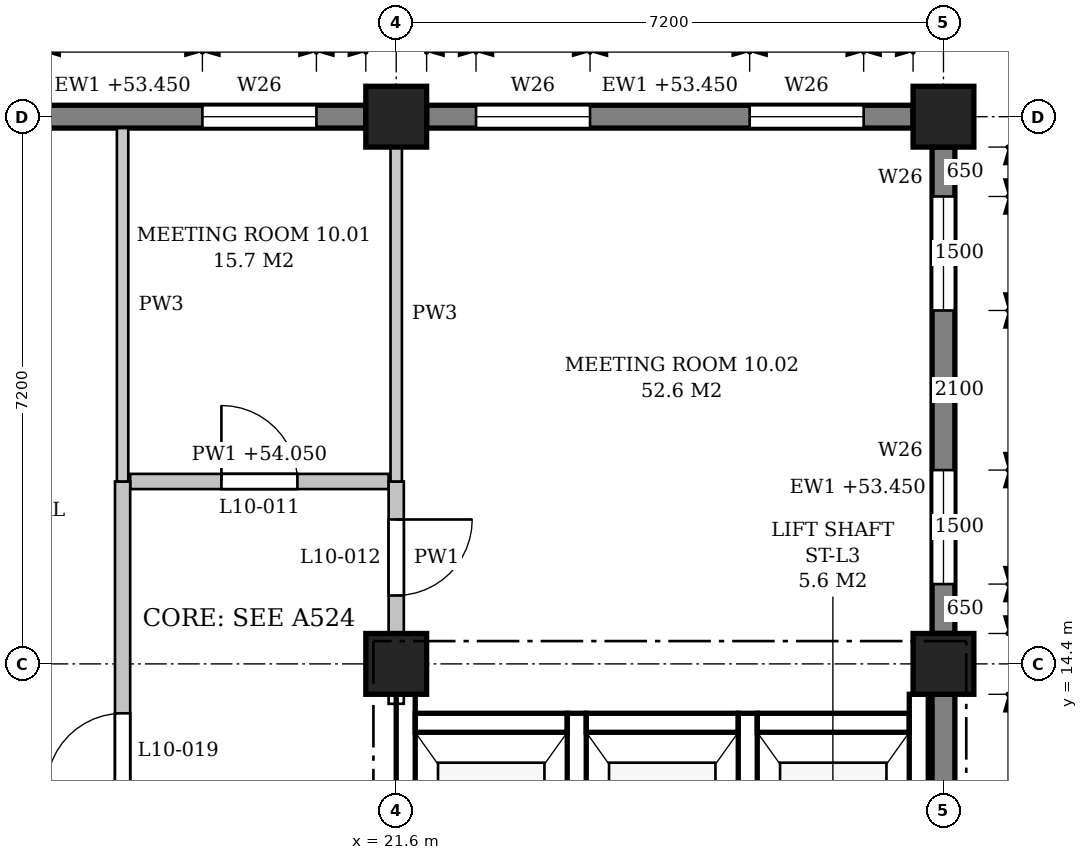
"""IFC4 building model, lengths in metres.
Left out: names, types, materials, properties, quantities, classifications, styles, units other than length and angle.
Written with IfcOpenShell. Run it as: python <this file> out.ifc"""

import sys

from ifc_helpers import new_model, si_unit, direction, frame, frame_2d, origin, origin_2d, place, context, subcontext, project, spatial, polyline, rectangle, outline, extrude, element, fill, save


model = new_model("IFC4")
c1 = context("Model", 3, precision=1e-05, world=origin(), true_north=direction((0.0, 1.0)))
c2 = subcontext(c1, "Body", "Model", "MODEL_VIEW")
j1 = project(units=[si_unit("LENGTHUNIT", "METRE"), si_unit("PLANEANGLEUNIT", "RADIAN")], contexts=[c1])
p1 = place(None, origin())
s1 = spatial("IfcSite", under=j1, at=p1, CompositionType="ELEMENT")
p2 = place(p1, origin())
s2 = spatial("IfcBuilding", under=s1, at=p2, CompositionType="ELEMENT")
p3 = place(p2, frame((0.0, 0.0, 49.8)))
s3 = spatial("IfcBuildingStorey", under=s2, at=p3, CompositionType="ELEMENT", Elevation=49.8)
for number, where, z_axis, x_axis in (
    (1, (21.6, 14.4, 0.0), (0.0, 0.0, 1.0), (1.0, 0.0, 0.0)),
    (2, (21.6, 21.6, 0.0), (0.0, 0.0, 1.0), (1.0, 0.0, 0.0)),
    (3, (28.8, 14.4, 0.0), (0.0, 0.0, 1.0), (1.0, 0.0, 0.0)),
    (4, (28.8, 21.6, 0.0), (0.0, 0.0, 1.0), (1.0, 0.0, 0.0)),
):
    element("IfcColumn", number, at=place(p3, frame(where, z_axis=z_axis, x_axis=x_axis)), inside=s3, PredefinedType="COLUMN", context=c2, shape_type="SweptSolid", body=[
        extrude(rectangle(XDim=0.8, YDim=0.8, at=origin_2d()), origin(), (0.0, 0.0, 1.0), 4.5),
    ])
p4 = place(p3, frame((28.8, 7.6, 0.0), z_axis=(0.0, 0.0, 1.0), x_axis=(0.0, 1.0, 0.0)))
e5 = element("IfcWall", 5, at=p4, inside=s3, PredefinedType="STANDARD", context=c2, shape_type="SweptSolid", body=[
    extrude(rectangle(XDim=6.4, YDim=0.3, at=frame_2d((3.2, 0.0))), origin(), (0.0, 0.0, 1.0), 3.65),
])
p5 = place(p4, frame((0.65, 0.0, 0.9)))
e6 = element("IfcOpeningElement", 6, at=p5, cuts=e5, PredefinedType="OPENING", context=c2, shape_type="SweptSolid", body=[
    extrude(outline(polyline([(0.0, 0.0), (1.5, 0.0), (1.5, 1.85), (0.75, 2.6), (0.0, 1.85), (0.0, 0.0)])), frame((0.0, 0.16, 0.0), z_axis=(0.0, -1.0, 0.0), x_axis=(1.0, 0.0, 0.0)), (0.0, 0.0, 1.0), 0.32),
])
p6 = place(p3, frame((28.8, 14.8, 0.0), z_axis=(0.0, 0.0, 1.0), x_axis=(0.0, 1.0, 0.0)))
e7 = element("IfcWall", 7, at=p6, inside=s3, PredefinedType="STANDARD", context=c2, shape_type="SweptSolid", body=[
    extrude(rectangle(XDim=6.4, YDim=0.3, at=frame_2d((3.2, 0.0))), origin(), (0.0, 0.0, 1.0), 3.65),
])
p7 = place(p6, frame((0.65, 0.0, 0.9)))
e8 = element("IfcOpeningElement", 8, at=p7, cuts=e7, PredefinedType="OPENING", context=c2, shape_type="SweptSolid", body=[
    extrude(outline(polyline([(0.0, 0.0), (1.5, 0.0), (1.5, 1.85), (0.75, 2.6), (0.0, 1.85), (0.0, 0.0)])), frame((0.0, 0.16, 0.0), z_axis=(0.0, -1.0, 0.0), x_axis=(1.0, 0.0, 0.0)), (0.0, 0.0, 1.0), 0.32),
])
p8 = place(p6, frame((4.25, 0.0, 0.9)))
e9 = element("IfcOpeningElement", 9, at=p8, cuts=e7, PredefinedType="OPENING", context=c2, shape_type="SweptSolid", body=[
    extrude(outline(polyline([(0.0, 0.0), (1.5, 0.0), (1.5, 1.85), (0.75, 2.6), (0.0, 1.85), (0.0, 0.0)])), frame((0.0, 0.16, 0.0), z_axis=(0.0, -1.0, 0.0), x_axis=(1.0, 0.0, 0.0)), (0.0, 0.0, 1.0), 0.32),
])
p9 = place(p3, frame((28.4, 21.6, 0.0), z_axis=(0.0, 0.0, 1.0), x_axis=(-1.0, 0.0, 0.0)))
e10 = element("IfcWall", 10, at=p9, inside=s3, PredefinedType="STANDARD", context=c2, shape_type="SweptSolid", body=[
    extrude(rectangle(XDim=6.4, YDim=0.3, at=frame_2d((3.2, 0.0))), origin(), (0.0, 0.0, 1.0), 3.65),
])
p10 = place(p9, frame((0.65, 0.0, 0.9)))
e11 = element("IfcOpeningElement", 11, at=p10, cuts=e10, PredefinedType="OPENING", context=c2, shape_type="SweptSolid", body=[
    extrude(outline(polyline([(0.0, 0.0), (1.5, 0.0), (1.5, 1.85), (0.75, 2.6), (0.0, 1.85), (0.0, 0.0)])), frame((0.0, 0.16, 0.0), z_axis=(0.0, -1.0, 0.0), x_axis=(1.0, 0.0, 0.0)), (0.0, 0.0, 1.0), 0.32),
])
p11 = place(p9, frame((4.25, 0.0, 0.9)))
e12 = element("IfcOpeningElement", 12, at=p11, cuts=e10, PredefinedType="OPENING", context=c2, shape_type="SweptSolid", body=[
    extrude(outline(polyline([(0.0, 0.0), (1.5, 0.0), (1.5, 1.85), (0.75, 2.6), (0.0, 1.85), (0.0, 0.0)])), frame((0.0, 0.16, 0.0), z_axis=(0.0, -1.0, 0.0), x_axis=(1.0, 0.0, 0.0)), (0.0, 0.0, 1.0), 0.32),
])
p12 = place(p3, frame((21.2, 21.6, 0.0), z_axis=(0.0, 0.0, 1.0), x_axis=(-1.0, 0.0, 0.0)))
e13 = element("IfcWall", 13, at=p12, inside=s3, PredefinedType="STANDARD", context=c2, shape_type="SweptSolid", body=[
    extrude(rectangle(XDim=6.4, YDim=0.3, at=frame_2d((3.2, 0.0))), origin(), (0.0, 0.0, 1.0), 3.65),
])
p13 = place(p12, frame((0.65, 0.0, 0.9)))
e14 = element("IfcOpeningElement", 14, at=p13, cuts=e13, PredefinedType="OPENING", context=c2, shape_type="SweptSolid", body=[
    extrude(outline(polyline([(0.0, 0.0), (1.5, 0.0), (1.5, 1.85), (0.75, 2.6), (0.0, 1.85), (0.0, 0.0)])), frame((0.0, 0.16, 0.0), z_axis=(0.0, -1.0, 0.0), x_axis=(1.0, 0.0, 0.0)), (0.0, 0.0, 1.0), 0.32),
])
p14 = place(p12, frame((4.25, 0.0, 0.9)))
e15 = element("IfcOpeningElement", 15, at=p14, cuts=e13, PredefinedType="OPENING", context=c2, shape_type="SweptSolid", body=[
    extrude(outline(polyline([(0.0, 0.0), (1.5, 0.0), (1.5, 1.85), (0.75, 2.6), (0.0, 1.85), (0.0, 0.0)])), frame((0.0, 0.16, 0.0), z_axis=(0.0, -1.0, 0.0), x_axis=(1.0, 0.0, 0.0)), (0.0, 0.0, 1.0), 0.32),
])
p15 = place(p3, frame((21.725, 10.45, -0.25), z_axis=(0.0, 0.0, 1.0), x_axis=(0.0, 1.0, 0.0)))
e16 = element("IfcWall", 16, at=p15, inside=s3, PredefinedType="SHEAR", context=c2, shape_type="SweptSolid", body=[
    extrude(rectangle(XDim=3.55, YDim=0.25, at=frame_2d((1.775, 0.0))), origin(), (0.0, 0.0, 1.0), 3.8),
])
for number, where, z_axis, x_axis in (
    (17, (23.975, 10.45, -0.25), (0.0, 0.0, 1.0), (0.0, 1.0, 0.0)),
    (18, (26.225, 10.45, -0.25), (0.0, 0.0, 1.0), (0.0, 1.0, 0.0)),
):
    element("IfcWall", number, at=place(p3, frame(where, z_axis=z_axis, x_axis=x_axis)), inside=s3, PredefinedType="SHEAR", context=c2, shape_type="SweptSolid", body=[
        extrude(rectangle(XDim=3.3, YDim=0.25, at=frame_2d((1.65, 0.0))), origin(), (0.0, 0.0, 1.0), 4.5),
    ])
p16 = place(p3, frame((28.475, 10.45, -0.25), z_axis=(0.0, 0.0, 1.0), x_axis=(0.0, 1.0, 0.0)))
e19 = element("IfcWall", 19, at=p16, inside=s3, PredefinedType="SHEAR", context=c2, shape_type="SweptSolid", body=[
    extrude(rectangle(XDim=3.55, YDim=0.25, at=frame_2d((1.775, 0.0))), origin(), (0.0, 0.0, 1.0), 4.5),
])
for number, where, z_axis, x_axis in (
    (20, (21.85, 13.625, -0.25), (0.0, 0.0, 1.0), (1.0, 0.0, 0.0)),
    (21, (24.1, 13.625, -0.25), (0.0, 0.0, 1.0), (1.0, 0.0, 0.0)),
    (22, (26.35, 13.625, -0.25), (0.0, 0.0, 1.0), (1.0, 0.0, 0.0)),
):
    element("IfcWall", number, at=place(p3, frame(where, z_axis=z_axis, x_axis=x_axis)), inside=s3, PredefinedType="SHEAR", context=c2, shape_type="SweptSolid", body=[
        extrude(rectangle(XDim=2.0, YDim=0.25, at=frame_2d((1.0, 0.0))), origin(), (0.0, 0.0, 1.0), 4.5),
    ])
p17 = place(p3, frame((18.1, 16.8, 0.0), z_axis=(0.0, 0.0, 1.0), x_axis=(1.0, 0.0, 0.0)))
e23 = element("IfcWall", 23, at=p17, inside=s3, PredefinedType="PARTITIONING", context=c2, shape_type="SweptSolid", body=[
    extrude(outline(polyline([(0.0, 0.0), (3.4, 0.0), (3.4, 3.55), (3.275, 3.55), (3.275, 4.25), (0.0, 4.25), (0.0, 0.0)])), frame((0.0, 0.1, 0.0), z_axis=(0.0, -1.0, 0.0), x_axis=(1.0, 0.0, 0.0)), (0.0, 0.0, 1.0), 0.2),
])
p18 = place(p17, frame((1.2, 0.0, 0.0)))
e24 = element("IfcOpeningElement", 24, at=p18, cuts=e23, PredefinedType="OPENING", context=c2, shape_type="SweptSolid", body=[
    extrude(rectangle(XDim=1.0, YDim=2.1, at=frame_2d((0.5, 1.05))), frame((0.0, 0.11, 0.0), z_axis=(0.0, -1.0, 0.0), x_axis=(1.0, 0.0, 0.0)), (0.0, 0.0, 1.0), 0.22),
])
p19 = place(p3, frame((18.0, 9.7, 0.0), z_axis=(0.0, 0.0, 1.0), x_axis=(0.0, 1.0, 0.0)))
e25 = element("IfcWall", 25, at=p19, inside=s3, PredefinedType="PARTITIONING", context=c2, shape_type="SweptSolid", body=[
    extrude(outline(polyline([(0.0, 0.0), (7.1, 0.0), (7.1, 4.25), (4.925, 4.25), (4.925, 3.55), (4.475, 3.55), (4.475, 4.25), (0.0, 4.25), (0.0, 0.0)])), frame((0.0, 0.1, 0.0), z_axis=(0.0, -1.0, 0.0), x_axis=(1.0, 0.0, 0.0)), (0.0, 0.0, 1.0), 0.2),
])
p20 = place(p19, frame((3.05, 0.0, 0.0)))
e26 = element("IfcOpeningElement", 26, at=p20, cuts=e25, PredefinedType="OPENING", context=c2, shape_type="SweptSolid", body=[
    extrude(rectangle(XDim=1.0, YDim=2.1, at=frame_2d((0.5, 1.05))), frame((0.0, 0.11, 0.0), z_axis=(0.0, -1.0, 0.0), x_axis=(1.0, 0.0, 0.0)), (0.0, 0.0, 1.0), 0.22),
])
p21 = place(p3, frame((18.0, 16.8, 0.0), z_axis=(0.0, 0.0, 1.0), x_axis=(0.0, 1.0, 0.0)))
e27 = element("IfcWall", 27, at=p21, inside=s3, PredefinedType="PARTITIONING", context=c2, shape_type="SweptSolid", body=[
    extrude(rectangle(XDim=4.65, YDim=0.15, at=frame_2d((2.325, 0.0))), origin(), (0.0, 0.0, 1.0), 3.55),
])
p22 = place(p3, frame((21.6, 13.875, 0.0), z_axis=(0.0, 0.0, 1.0), x_axis=(0.0, 1.0, 0.0)))
e28 = element("IfcWall", 28, at=p22, inside=s3, PredefinedType="PARTITIONING", context=c2, shape_type="SweptSolid", body=[
    extrude(rectangle(XDim=0.125, YDim=0.2, at=frame_2d((0.062, 0.0))), origin(), (0.0, 0.0, 1.0), 3.55),
])
p23 = place(p3, frame((21.6, 14.8, 0.0), z_axis=(0.0, 0.0, 1.0), x_axis=(0.0, 1.0, 0.0)))
e29 = element("IfcWall", 29, at=p23, inside=s3, PredefinedType="PARTITIONING", context=c2, shape_type="SweptSolid", body=[
    extrude(rectangle(XDim=2.0, YDim=0.2, at=frame_2d((1.0, 0.0))), origin(), (0.0, 0.0, 1.0), 3.55),
])
p24 = place(p23, frame((0.5, 0.0, 0.0)))
e30 = element("IfcOpeningElement", 30, at=p24, cuts=e29, PredefinedType="OPENING", context=c2, shape_type="SweptSolid", body=[
    extrude(rectangle(XDim=1.0, YDim=2.1, at=frame_2d((0.5, 1.05))), frame((0.0, 0.11, 0.0), z_axis=(0.0, -1.0, 0.0), x_axis=(1.0, 0.0, 0.0)), (0.0, 0.0, 1.0), 0.22),
])
p25 = place(p3, frame((21.6, 16.8, 0.0), z_axis=(0.0, 0.0, 1.0), x_axis=(0.0, 1.0, 0.0)))
e31 = element("IfcWall", 31, at=p25, inside=s3, PredefinedType="PARTITIONING", context=c2, shape_type="SweptSolid", body=[
    extrude(rectangle(XDim=4.4, YDim=0.15, at=frame_2d((2.2, 0.0))), origin(), (0.0, 0.0, 1.0), 3.55),
])
p26 = place(p7, origin())
e32 = element("IfcWindow", 32, at=p26, inside=s3, PartitioningType="SINGLE_PANEL", PredefinedType="WINDOW", context=c2, shape_type="SweptSolid", body=[
    extrude(outline(polyline([(0.0, 0.0), (1.5, 0.0), (1.5, 1.85), (0.75, 2.6), (0.0, 1.85), (0.0, 0.0)])), frame((0.0, 0.03, 0.0), z_axis=(0.0, -1.0, 0.0), x_axis=(1.0, 0.0, 0.0)), (0.0, 0.0, 1.0), 0.06),
])
fill(e8, e32)
p27 = place(p8, origin())
e33 = element("IfcWindow", 33, at=p27, inside=s3, PartitioningType="SINGLE_PANEL", PredefinedType="WINDOW", context=c2, shape_type="SweptSolid", body=[
    extrude(outline(polyline([(0.0, 0.0), (1.5, 0.0), (1.5, 1.85), (0.75, 2.6), (0.0, 1.85), (0.0, 0.0)])), frame((0.0, 0.03, 0.0), z_axis=(0.0, -1.0, 0.0), x_axis=(1.0, 0.0, 0.0)), (0.0, 0.0, 1.0), 0.06),
])
fill(e9, e33)
p28 = place(p10, origin())
e34 = element("IfcWindow", 34, at=p28, inside=s3, PartitioningType="SINGLE_PANEL", PredefinedType="WINDOW", context=c2, shape_type="SweptSolid", body=[
    extrude(outline(polyline([(0.0, 0.0), (1.5, 0.0), (1.5, 1.85), (0.75, 2.6), (0.0, 1.85), (0.0, 0.0)])), frame((0.0, 0.03, 0.0), z_axis=(0.0, -1.0, 0.0), x_axis=(1.0, 0.0, 0.0)), (0.0, 0.0, 1.0), 0.06),
])
fill(e11, e34)
p29 = place(p11, origin())
e35 = element("IfcWindow", 35, at=p29, inside=s3, PartitioningType="SINGLE_PANEL", PredefinedType="WINDOW", context=c2, shape_type="SweptSolid", body=[
    extrude(outline(polyline([(0.0, 0.0), (1.5, 0.0), (1.5, 1.85), (0.75, 2.6), (0.0, 1.85), (0.0, 0.0)])), frame((0.0, 0.03, 0.0), z_axis=(0.0, -1.0, 0.0), x_axis=(1.0, 0.0, 0.0)), (0.0, 0.0, 1.0), 0.06),
])
fill(e12, e35)
p30 = place(p13, origin())
e36 = element("IfcWindow", 36, at=p30, inside=s3, PartitioningType="SINGLE_PANEL", PredefinedType="WINDOW", context=c2, shape_type="SweptSolid", body=[
    extrude(outline(polyline([(0.0, 0.0), (1.5, 0.0), (1.5, 1.85), (0.75, 2.6), (0.0, 1.85), (0.0, 0.0)])), frame((0.0, 0.03, 0.0), z_axis=(0.0, -1.0, 0.0), x_axis=(1.0, 0.0, 0.0)), (0.0, 0.0, 1.0), 0.06),
])
fill(e14, e36)
p31 = place(p18, origin())
e37 = element("IfcDoor", 37, at=p31, inside=s3, OperationType="SINGLE_SWING_LEFT", PredefinedType="DOOR", context=c2, shape_type="SweptSolid", body=[
    extrude(rectangle(XDim=1.0, YDim=2.1, at=frame_2d((0.5, 1.05))), frame((0.0, 0.025, 0.0), z_axis=(0.0, -1.0, 0.0), x_axis=(1.0, 0.0, 0.0)), (0.0, 0.0, 1.0), 0.05),
])
fill(e24, e37)
p32 = place(p24, frame((1.0, 0.0, 0.0), z_axis=(0.0, 0.0, 1.0), x_axis=(-1.0, 0.0, 0.0)))
e38 = element("IfcDoor", 38, at=p32, inside=s3, OperationType="SINGLE_SWING_LEFT", PredefinedType="DOOR", context=c2, shape_type="SweptSolid", body=[
    extrude(rectangle(XDim=1.0, YDim=2.1, at=frame_2d((0.5, 1.05))), frame((0.0, 0.025, 0.0), z_axis=(0.0, -1.0, 0.0), x_axis=(1.0, 0.0, 0.0)), (0.0, 0.0, 1.0), 0.05),
])
fill(e30, e38)
p33 = place(p20, origin())
e39 = element("IfcDoor", 39, at=p33, inside=s3, OperationType="SINGLE_SWING_LEFT", PredefinedType="DOOR", context=c2, shape_type="SweptSolid", body=[
    extrude(rectangle(XDim=1.0, YDim=2.1, at=frame_2d((0.5, 1.05))), frame((0.0, 0.025, 0.0), z_axis=(0.0, -1.0, 0.0), x_axis=(1.0, 0.0, 0.0)), (0.0, 0.0, 1.0), 0.05),
])
fill(e26, e39)
save(model, sys.argv[1])
